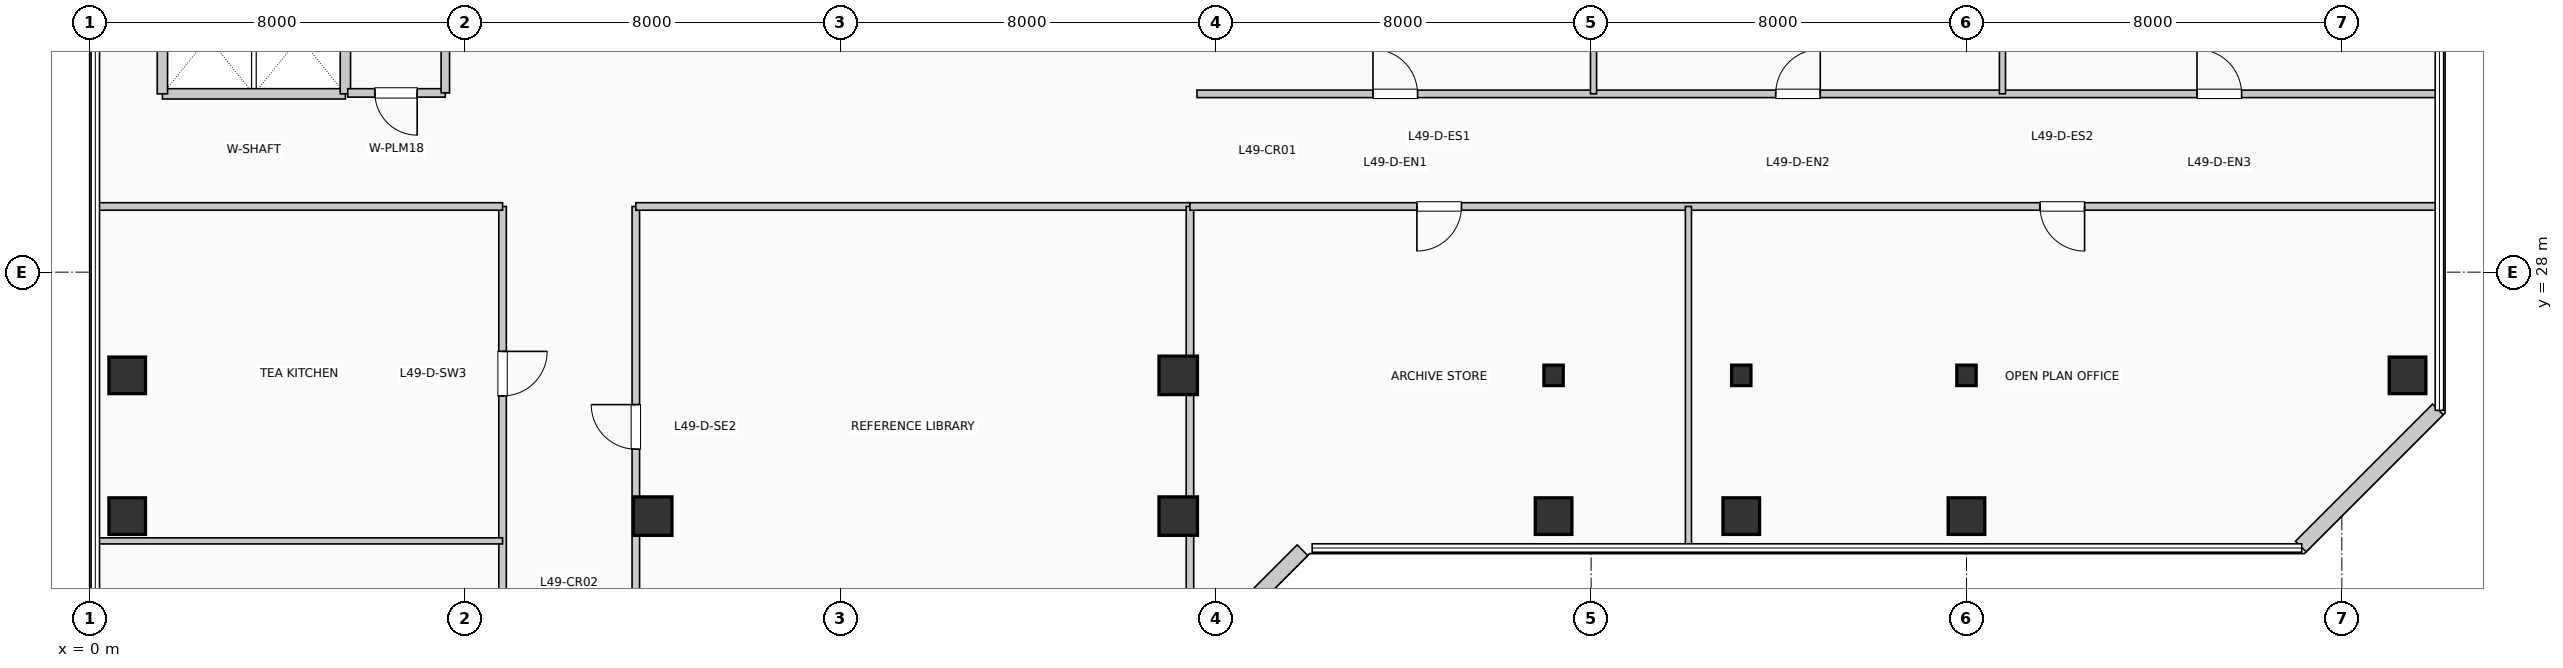
"""IFC4 building model, lengths in metres.
Left out: names, types, materials, properties, quantities, classifications, styles, units other than length and angle.
Written with IfcOpenShell. Run it as: python <this file> out.ifc"""

import sys

from ifc_helpers import new_model, si_unit, direction, frame, frame_2d, origin, origin_2d, place, context, subcontext, project, spatial, rectangle, i_section, extrude, element, fill, save


model = new_model("IFC4")
c1 = context("Model", 3, precision=1e-05, world=origin(), true_north=direction((0.0, 1.0)))
c2 = subcontext(c1, "Body", "Model", "MODEL_VIEW")
j1 = project(units=[si_unit("LENGTHUNIT", "METRE"), si_unit("PLANEANGLEUNIT", "RADIAN")], contexts=[c1])
p1 = place(None, origin())
s1 = spatial("IfcSite", under=j1, at=p1, CompositionType="ELEMENT")
p2 = place(p1, origin())
s2 = spatial("IfcBuilding", under=s1, at=p2, CompositionType="ELEMENT")
p3 = place(p2, frame((0.0, 0.0, 203.28)))
s3 = spatial("IfcBuildingStorey", under=s2, at=p3, CompositionType="ELEMENT", Elevation=203.28)
for number, where, z_axis, x_axis in (
    (1, (0.8, 22.8, 0.0), (0.0, 0.0, 1.0), (1.0, 0.0, 0.0)),
    (2, (0.8, 25.8, 0.0), (0.0, 0.0, 1.0), (1.0, 0.0, 0.0)),
):
    element("IfcColumn", number, at=place(p3, frame(where, z_axis=z_axis, x_axis=x_axis)), inside=s3, PredefinedType="COLUMN", context=c2, shape_type="SweptSolid", body=[
        extrude(rectangle(XDim=0.78, YDim=0.78, at=origin_2d()), origin(), (0.0, 0.0, 1.0), 3.96),
    ])
for number, where, z_axis, x_axis in (
    (3, (12.0, 22.8, 0.0), (0.0, 0.0, 1.0), (1.0, 0.0, 0.0)),
    (4, (23.2, 22.8, 0.0), (0.0, 0.0, 1.0), (1.0, 0.0, 0.0)),
    (5, (23.2, 25.8, 0.0), (0.0, 0.0, 1.0), (1.0, 0.0, 0.0)),
):
    element("IfcColumn", number, at=place(p3, frame(where, z_axis=z_axis, x_axis=x_axis)), inside=s3, PredefinedType="COLUMN", context=c2, shape_type="SweptSolid", body=[
        extrude(rectangle(XDim=0.82, YDim=0.82, at=origin_2d()), origin(), (0.0, 0.0, 1.0), 3.96),
    ])
p4 = place(p3, frame((31.2, 22.8, 0.0), z_axis=(0.0, 0.0, 1.0), x_axis=(1.0, 0.0, 0.0)))
e6 = element("IfcColumn", 6, at=p4, inside=s3, PredefinedType="COLUMN", context=c2, shape_type="SweptSolid", body=[
    extrude(rectangle(XDim=0.78, YDim=0.78, at=origin_2d()), origin(), (0.0, 0.0, 1.0), 3.96),
])
p5 = place(p3, frame((31.2, 25.8, 0.0), z_axis=(0.0, 0.0, 1.0), x_axis=(1.0, 0.0, 0.0)))
e7 = element("IfcColumn", 7, at=p5, inside=s3, PredefinedType="COLUMN", context=c2, shape_type="SweptSolid", body=[
    extrude(i_section(OverallWidth=0.412, OverallDepth=0.435, WebThickness=0.027, FlangeThickness=0.043, at=origin_2d()), origin(), (0.0, 0.0, 1.0), 3.96),
])
p6 = place(p3, frame((35.2, 22.8, 0.0), z_axis=(0.0, 0.0, 1.0), x_axis=(1.0, 0.0, 0.0)))
e8 = element("IfcColumn", 8, at=p6, inside=s3, PredefinedType="COLUMN", context=c2, shape_type="SweptSolid", body=[
    extrude(rectangle(XDim=0.78, YDim=0.78, at=origin_2d()), origin(), (0.0, 0.0, 1.0), 3.96),
])
p7 = place(p3, frame((35.2, 25.8, 0.0), z_axis=(0.0, 0.0, 1.0), x_axis=(1.0, 0.0, 0.0)))
e9 = element("IfcColumn", 9, at=p7, inside=s3, PredefinedType="COLUMN", context=c2, shape_type="SweptSolid", body=[
    extrude(i_section(OverallWidth=0.412, OverallDepth=0.435, WebThickness=0.027, FlangeThickness=0.043, at=origin_2d()), origin(), (0.0, 0.0, 1.0), 3.96),
])
p8 = place(p3, frame((40.0, 22.8, 0.0), z_axis=(0.0, 0.0, 1.0), x_axis=(1.0, 0.0, 0.0)))
e10 = element("IfcColumn", 10, at=p8, inside=s3, PredefinedType="COLUMN", context=c2, shape_type="SweptSolid", body=[
    extrude(rectangle(XDim=0.78, YDim=0.78, at=origin_2d()), origin(), (0.0, 0.0, 1.0), 3.96),
])
p9 = place(p3, frame((40.0, 25.8, 0.0), z_axis=(0.0, 0.0, 1.0), x_axis=(1.0, 0.0, 0.0)))
e11 = element("IfcColumn", 11, at=p9, inside=s3, PredefinedType="COLUMN", context=c2, shape_type="SweptSolid", body=[
    extrude(i_section(OverallWidth=0.412, OverallDepth=0.435, WebThickness=0.027, FlangeThickness=0.043, at=origin_2d()), origin(), (0.0, 0.0, 1.0), 3.96),
])
p10 = place(p3, frame((49.4, 25.8, 0.0), z_axis=(0.0, 0.0, 1.0), x_axis=(1.0, 0.0, 0.0)))
e12 = element("IfcColumn", 12, at=p10, inside=s3, PredefinedType="COLUMN", context=c2, shape_type="SweptSolid", body=[
    extrude(rectangle(XDim=0.78, YDim=0.78, at=origin_2d()), origin(), (0.0, 0.0, 1.0), 3.96),
])
p11 = place(p3, frame((23.926, 20.152, 0.0), z_axis=(0.0, 0.0, 1.0), x_axis=(0.707106781187, 0.707106781187, 0.0)))
e13 = element("IfcWall", 13, at=p11, inside=s3, PredefinedType="SOLIDWALL", context=c2, shape_type="SweptSolid", body=[
    extrude(rectangle(XDim=2.718, YDim=0.32, at=frame_2d((1.359, 0.0))), origin(), (0.0, 0.0, 1.0), 3.71),
])
p12 = place(p3, frame((47.126, 22.152, 0.0), z_axis=(0.0, 0.0, 1.0), x_axis=(0.707136318428, 0.707077242712, 0.0)))
e14 = element("IfcWall", 14, at=p12, inside=s3, PredefinedType="SOLIDWALL", context=c2, shape_type="SweptSolid", body=[
    extrude(rectangle(XDim=4.133, YDim=0.32, at=frame_2d((2.066, 0.0))), origin(), (0.0, 0.0, 1.0), 3.71),
])
p13 = place(p3, frame((1.55, 31.8, 0.0), z_axis=(0.0, 0.0, 1.0), x_axis=(1.0, 0.0, 0.0)))
e15 = element("IfcWall", 15, at=p13, inside=s3, PredefinedType="PARTITIONING", context=c2, shape_type="SweptSolid", body=[
    extrude(rectangle(XDim=3.9, YDim=0.22, at=frame_2d((1.95, 0.0))), origin(), (0.0, 0.0, 1.0), 3.71),
])
for number, where, z_axis, x_axis in (
    (16, (1.55, 31.8, 0.0), (0.0, 0.0, 1.0), (0.0, 1.0, 0.0)),
    (17, (5.45, 31.8, 0.0), (0.0, 0.0, 1.0), (0.0, 1.0, 0.0)),
):
    element("IfcWall", number, at=place(p3, frame(where, z_axis=z_axis, x_axis=x_axis)), inside=s3, PredefinedType="PARTITIONING", context=c2, shape_type="SweptSolid", body=[
        extrude(rectangle(XDim=2.38, YDim=0.22, at=frame_2d((1.19, 0.0))), origin(), (0.0, 0.0, 1.0), 3.71),
    ])
p14 = place(p3, frame((5.5, 31.82, 0.0), z_axis=(0.0, 0.0, 1.0), x_axis=(1.0, 0.0, 0.0)))
e18 = element("IfcWall", 18, at=p14, inside=s3, PredefinedType="PLUMBINGWALL", context=c2, shape_type="SweptSolid", body=[
    extrude(rectangle(XDim=2.08, YDim=0.18, at=frame_2d((1.04, 0.0))), origin(), (0.0, 0.0, 1.0), 3.71),
])
p15 = place(p14, frame((1.48, 0.0, 0.0), z_axis=(0.0, 0.0, 1.0), x_axis=(-1.0, 0.0, 0.0)))
e19 = element("IfcOpeningElement", 19, at=p15, cuts=e18, PredefinedType="OPENING", context=c2, shape_type="SweptSolid", body=[
    extrude(rectangle(XDim=0.9, YDim=2.1, at=frame_2d((0.45, 1.05))), frame((0.0, 0.1, 0.0), z_axis=(0.0, -1.0, 0.0), x_axis=(1.0, 0.0, 0.0)), (0.0, 0.0, 1.0), 0.2),
])
p16 = place(p3, frame((7.58, 31.82, 0.0), z_axis=(0.0, 0.0, 1.0), x_axis=(0.0, 1.0, 0.0)))
e20 = element("IfcWall", 20, at=p16, inside=s3, PredefinedType="PLUMBINGWALL", context=c2, shape_type="SweptSolid", body=[
    extrude(rectangle(XDim=2.36, YDim=0.18, at=frame_2d((1.18, 0.0))), origin(), (0.0, 0.0, 1.0), 3.71),
])
p17 = place(p3, frame((8.8, 13.2, 0.0), z_axis=(0.0, 0.0, 1.0), x_axis=(0.0, 1.0, 0.0)))
e21 = element("IfcWall", 21, at=p17, inside=s3, PredefinedType="PARTITIONING", context=c2, shape_type="SweptSolid", body=[
    extrude(rectangle(XDim=16.2, YDim=0.16, at=frame_2d((8.1, 0.0))), origin(), (0.0, 0.0, 1.0), 3.71),
])
p18 = place(p17, frame((2.581, 0.0, 0.0), z_axis=(0.0, 0.0, 1.0), x_axis=(-1.0, 0.0, 0.0)))
e22 = element("IfcOpeningElement", 22, at=p18, cuts=e21, PredefinedType="OPENING", context=c2, shape_type="SweptSolid", body=[
    extrude(rectangle(XDim=0.95, YDim=2.15, at=frame_2d((0.475, 1.075))), frame((0.0, 0.09, 0.0), z_axis=(0.0, -1.0, 0.0), x_axis=(1.0, 0.0, 0.0)), (0.0, 0.0, 1.0), 0.18),
])
p19 = place(p17, frame((7.117, 0.0, 0.0), z_axis=(0.0, 0.0, 1.0), x_axis=(-1.0, 0.0, 0.0)))
e23 = element("IfcOpeningElement", 23, at=p19, cuts=e21, PredefinedType="OPENING", context=c2, shape_type="SweptSolid", body=[
    extrude(rectangle(XDim=0.95, YDim=2.15, at=frame_2d((0.475, 1.075))), frame((0.0, 0.09, 0.0), z_axis=(0.0, -1.0, 0.0), x_axis=(1.0, 0.0, 0.0)), (0.0, 0.0, 1.0), 0.18),
])
p20 = place(p17, frame((13.111, 0.0, 0.0), z_axis=(0.0, 0.0, 1.0), x_axis=(-1.0, 0.0, 0.0)))
e24 = element("IfcOpeningElement", 24, at=p20, cuts=e21, PredefinedType="OPENING", context=c2, shape_type="SweptSolid", body=[
    extrude(rectangle(XDim=0.95, YDim=2.15, at=frame_2d((0.475, 1.075))), frame((0.0, 0.09, 0.0), z_axis=(0.0, -1.0, 0.0), x_axis=(1.0, 0.0, 0.0)), (0.0, 0.0, 1.0), 0.18),
])
p21 = place(p3, frame((11.64, 13.2, 0.0), z_axis=(0.0, 0.0, 1.0), x_axis=(0.0, 1.0, 0.0)))
e25 = element("IfcWall", 25, at=p21, inside=s3, PredefinedType="PARTITIONING", context=c2, shape_type="SweptSolid", body=[
    extrude(rectangle(XDim=16.2, YDim=0.16, at=frame_2d((8.1, 0.0))), origin(), (0.0, 0.0, 1.0), 3.095),
])
p22 = place(p21, frame((3.427, 0.0, 0.0)))
e26 = element("IfcOpeningElement", 26, at=p22, cuts=e25, PredefinedType="OPENING", context=c2, shape_type="SweptSolid", body=[
    extrude(rectangle(XDim=0.95, YDim=2.15, at=frame_2d((0.475, 1.075))), frame((0.0, 0.09, 0.0), z_axis=(0.0, -1.0, 0.0), x_axis=(1.0, 0.0, 0.0)), (0.0, 0.0, 1.0), 0.18),
])
p23 = place(p21, frame((11.027, 0.0, 0.0)))
e27 = element("IfcOpeningElement", 27, at=p23, cuts=e25, PredefinedType="OPENING", context=c2, shape_type="SweptSolid", body=[
    extrude(rectangle(XDim=0.95, YDim=2.15, at=frame_2d((0.475, 1.075))), frame((0.0, 0.09, 0.0), z_axis=(0.0, -1.0, 0.0), x_axis=(1.0, 0.0, 0.0)), (0.0, 0.0, 1.0), 0.18),
])
p24 = place(p3, frame((0.19, 29.4, 0.0), z_axis=(0.0, 0.0, 1.0), x_axis=(1.0, 0.0, 0.0)))
e28 = element("IfcWall", 28, at=p24, inside=s3, PredefinedType="PARTITIONING", context=c2, shape_type="SweptSolid", body=[
    extrude(rectangle(XDim=8.61, YDim=0.16, at=frame_2d((4.305, 0.0))), origin(), (0.0, 0.0, 1.0), 3.365),
])
p25 = place(p3, frame((11.64, 29.4, 0.0), z_axis=(0.0, 0.0, 1.0), x_axis=(1.0, 0.0, 0.0)))
e29 = element("IfcWall", 29, at=p25, inside=s3, PredefinedType="PARTITIONING", context=c2, shape_type="SweptSolid", body=[
    extrude(rectangle(XDim=11.81, YDim=0.16, at=frame_2d((5.905, 0.0))), origin(), (0.0, 0.0, 1.0), 3.365),
])
p26 = place(p3, frame((23.45, 5.99, 0.0), z_axis=(0.0, 0.0, 1.0), x_axis=(0.0, 1.0, 0.0)))
e30 = element("IfcWall", 30, at=p26, inside=s3, PredefinedType="PARTITIONING", context=c2, shape_type="SweptSolid", body=[
    extrude(rectangle(XDim=23.41, YDim=0.16, at=frame_2d((11.705, 0.0))), origin(), (0.0, 0.0, 1.0), 3.095),
])
p27 = place(p3, frame((0.19, 22.272, 0.0), z_axis=(0.0, 0.0, 1.0), x_axis=(1.0, 0.0, 0.0)))
e31 = element("IfcWall", 31, at=p27, inside=s3, PredefinedType="PARTITIONING", context=c2, shape_type="SweptSolid", body=[
    extrude(rectangle(XDim=8.61, YDim=0.13, at=frame_2d((4.305, 0.0))), origin(), (0.0, 0.0, 1.0), 3.71),
])
p28 = place(p3, frame((23.45, 29.4, 0.0), z_axis=(0.0, 0.0, 1.0), x_axis=(1.0, 0.0, 0.0)))
e32 = element("IfcWall", 32, at=p28, inside=s3, PredefinedType="PARTITIONING", context=c2, shape_type="SweptSolid", body=[
    extrude(rectangle(XDim=26.56, YDim=0.16, at=frame_2d((13.28, 0.0))), origin(), (0.0, 0.0, 1.0), 3.365),
])
p29 = place(p28, frame((5.787, 0.0, 0.0), z_axis=(0.0, 0.0, 1.0), x_axis=(-1.0, 0.0, 0.0)))
e33 = element("IfcOpeningElement", 33, at=p29, cuts=e32, PredefinedType="OPENING", context=c2, shape_type="SweptSolid", body=[
    extrude(rectangle(XDim=0.95, YDim=2.15, at=frame_2d((0.475, 1.075))), frame((0.0, 0.09, 0.0), z_axis=(0.0, -1.0, 0.0), x_axis=(1.0, 0.0, 0.0)), (0.0, 0.0, 1.0), 0.18),
])
p30 = place(p28, frame((19.067, 0.0, 0.0), z_axis=(0.0, 0.0, 1.0), x_axis=(-1.0, 0.0, 0.0)))
e34 = element("IfcOpeningElement", 34, at=p30, cuts=e32, PredefinedType="OPENING", context=c2, shape_type="SweptSolid", body=[
    extrude(rectangle(XDim=0.95, YDim=2.15, at=frame_2d((0.475, 1.075))), frame((0.0, 0.09, 0.0), z_axis=(0.0, -1.0, 0.0), x_axis=(1.0, 0.0, 0.0)), (0.0, 0.0, 1.0), 0.18),
])
p31 = place(p3, frame((23.6, 31.8, 0.0), z_axis=(0.0, 0.0, 1.0), x_axis=(1.0, 0.0, 0.0)))
e35 = element("IfcWall", 35, at=p31, inside=s3, PredefinedType="PARTITIONING", context=c2, shape_type="SweptSolid", body=[
    extrude(rectangle(XDim=26.41, YDim=0.16, at=frame_2d((13.205, 0.0))), origin(), (0.0, 0.0, 1.0), 3.71),
])
p32 = place(p31, frame((3.75, 0.0, 0.0)))
e36 = element("IfcOpeningElement", 36, at=p32, cuts=e35, PredefinedType="OPENING", context=c2, shape_type="SweptSolid", body=[
    extrude(rectangle(XDim=0.95, YDim=2.15, at=frame_2d((0.475, 1.075))), frame((0.0, 0.09, 0.0), z_axis=(0.0, -1.0, 0.0), x_axis=(1.0, 0.0, 0.0)), (0.0, 0.0, 1.0), 0.18),
])
p33 = place(p31, frame((12.334, 0.0, 0.0)))
e37 = element("IfcOpeningElement", 37, at=p33, cuts=e35, PredefinedType="OPENING", context=c2, shape_type="SweptSolid", body=[
    extrude(rectangle(XDim=0.95, YDim=2.15, at=frame_2d((0.475, 1.075))), frame((0.0, 0.09, 0.0), z_axis=(0.0, -1.0, 0.0), x_axis=(1.0, 0.0, 0.0)), (0.0, 0.0, 1.0), 0.18),
])
p34 = place(p31, frame((21.313, 0.0, 0.0)))
e38 = element("IfcOpeningElement", 38, at=p34, cuts=e35, PredefinedType="OPENING", context=c2, shape_type="SweptSolid", body=[
    extrude(rectangle(XDim=0.95, YDim=2.15, at=frame_2d((0.475, 1.075))), frame((0.0, 0.09, 0.0), z_axis=(0.0, -1.0, 0.0), x_axis=(1.0, 0.0, 0.0)), (0.0, 0.0, 1.0), 0.18),
])
p35 = place(p3, frame((34.074, 22.19, 0.0), z_axis=(0.0, 0.0, 1.0), x_axis=(0.0, 1.0, 0.0)))
e39 = element("IfcWall", 39, at=p35, inside=s3, PredefinedType="PARTITIONING", context=c2, shape_type="SweptSolid", body=[
    extrude(rectangle(XDim=7.21, YDim=0.13, at=frame_2d((3.605, 0.0))), origin(), (0.0, 0.0, 1.0), 3.71),
])
for number, where, z_axis, x_axis in (
    (40, (32.051, 31.8, 0.0), (0.0, 0.0, 1.0), (0.0, 1.0, 0.0)),
    (41, (40.767, 31.8, 0.0), (0.0, 0.0, 1.0), (0.0, 1.0, 0.0)),
):
    element("IfcWall", number, at=place(p3, frame(where, z_axis=z_axis, x_axis=x_axis)), inside=s3, PredefinedType="PARTITIONING", context=c2, shape_type="SweptSolid", body=[
        extrude(rectangle(XDim=14.01, YDim=0.13, at=frame_2d((7.005, 0.0))), origin(), (0.0, 0.0, 1.0), 3.71),
    ])
p36 = place(p15, origin())
e42 = element("IfcDoor", 42, at=p36, inside=s3, OperationType="SINGLE_SWING_RIGHT", PredefinedType="DOOR", context=c2, shape_type="SweptSolid", body=[
    extrude(rectangle(XDim=0.9, YDim=2.1, at=frame_2d((0.45, 1.05))), frame((0.0, 0.025, 0.0), z_axis=(0.0, -1.0, 0.0), x_axis=(1.0, 0.0, 0.0)), (0.0, 0.0, 1.0), 0.05),
])
fill(e19, e42)
p37 = place(p20, origin())
e43 = element("IfcDoor", 43, at=p37, inside=s3, OperationType="SINGLE_SWING_RIGHT", PredefinedType="DOOR", context=c2, shape_type="SweptSolid", body=[
    extrude(rectangle(XDim=0.95, YDim=2.15, at=frame_2d((0.475, 1.075))), frame((0.0, 0.025, 0.0), z_axis=(0.0, -1.0, 0.0), x_axis=(1.0, 0.0, 0.0)), (0.0, 0.0, 1.0), 0.05),
])
fill(e24, e43)
p38 = place(p23, origin())
e44 = element("IfcDoor", 44, at=p38, inside=s3, OperationType="SINGLE_SWING_RIGHT", PredefinedType="DOOR", context=c2, shape_type="SweptSolid", body=[
    extrude(rectangle(XDim=0.95, YDim=2.15, at=frame_2d((0.475, 1.075))), frame((0.0, 0.025, 0.0), z_axis=(0.0, -1.0, 0.0), x_axis=(1.0, 0.0, 0.0)), (0.0, 0.0, 1.0), 0.05),
])
fill(e27, e44)
p39 = place(p29, origin())
e45 = element("IfcDoor", 45, at=p39, inside=s3, OperationType="SINGLE_SWING_LEFT", PredefinedType="DOOR", context=c2, shape_type="SweptSolid", body=[
    extrude(rectangle(XDim=0.95, YDim=2.15, at=frame_2d((0.475, 1.075))), frame((0.0, 0.025, 0.0), z_axis=(0.0, -1.0, 0.0), x_axis=(1.0, 0.0, 0.0)), (0.0, 0.0, 1.0), 0.05),
])
fill(e33, e45)
p40 = place(p30, origin())
e46 = element("IfcDoor", 46, at=p40, inside=s3, OperationType="SINGLE_SWING_RIGHT", PredefinedType="DOOR", context=c2, shape_type="SweptSolid", body=[
    extrude(rectangle(XDim=0.95, YDim=2.15, at=frame_2d((0.475, 1.075))), frame((0.0, 0.025, 0.0), z_axis=(0.0, -1.0, 0.0), x_axis=(1.0, 0.0, 0.0)), (0.0, 0.0, 1.0), 0.05),
])
fill(e34, e46)
p41 = place(p32, origin())
e47 = element("IfcDoor", 47, at=p41, inside=s3, OperationType="SINGLE_SWING_LEFT", PredefinedType="DOOR", context=c2, shape_type="SweptSolid", body=[
    extrude(rectangle(XDim=0.95, YDim=2.15, at=frame_2d((0.475, 1.075))), frame((0.0, 0.025, 0.0), z_axis=(0.0, -1.0, 0.0), x_axis=(1.0, 0.0, 0.0)), (0.0, 0.0, 1.0), 0.05),
])
fill(e36, e47)
p42 = place(p33, origin())
e48 = element("IfcDoor", 48, at=p42, inside=s3, OperationType="SINGLE_SWING_RIGHT", PredefinedType="DOOR", context=c2, shape_type="SweptSolid", body=[
    extrude(rectangle(XDim=0.95, YDim=2.15, at=frame_2d((0.475, 1.075))), frame((0.0, 0.025, 0.0), z_axis=(0.0, -1.0, 0.0), x_axis=(1.0, 0.0, 0.0)), (0.0, 0.0, 1.0), 0.05),
])
fill(e37, e48)
p43 = place(p34, origin())
e49 = element("IfcDoor", 49, at=p43, inside=s3, OperationType="SINGLE_SWING_LEFT", PredefinedType="DOOR", context=c2, shape_type="SweptSolid", body=[
    extrude(rectangle(XDim=0.95, YDim=2.15, at=frame_2d((0.475, 1.075))), frame((0.0, 0.025, 0.0), z_axis=(0.0, -1.0, 0.0), x_axis=(1.0, 0.0, 0.0)), (0.0, 0.0, 1.0), 0.05),
])
fill(e38, e49)
save(model, sys.argv[1])
